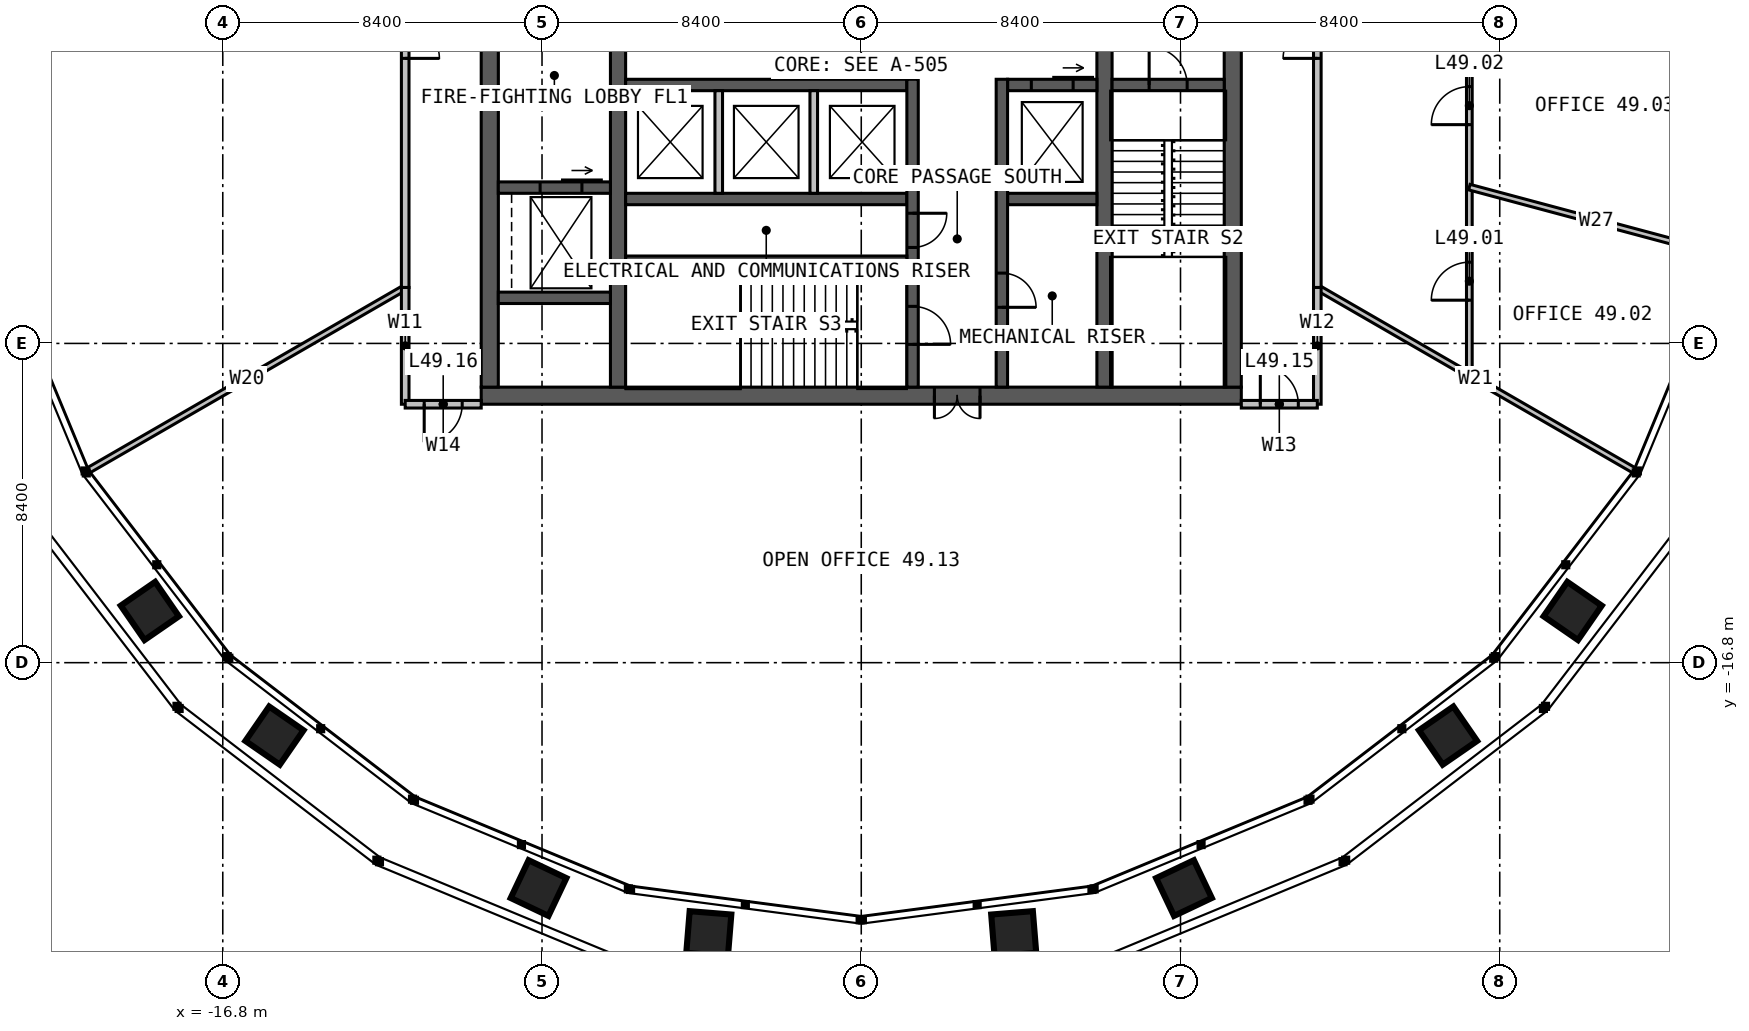
"""IFC4 building model, lengths in metres.
Left out: names, types, materials, properties, quantities, classifications, styles, units other than length and angle.
Written with IfcOpenShell. Run it as: python <this file> out.ifc"""

import sys

from ifc_helpers import new_model, si_unit, direction, frame, frame_2d, origin, place, context, subcontext, project, spatial, rectangle, extrude, element, fill, save


model = new_model("IFC4")
c1 = context("Model", 3, precision=1e-05, world=origin(), true_north=direction((0.0, 1.0)))
c2 = subcontext(c1, "Body", "Model", "MODEL_VIEW")
j1 = project(units=[si_unit("LENGTHUNIT", "METRE"), si_unit("PLANEANGLEUNIT", "RADIAN")], contexts=[c1])
p1 = place(None, origin())
s1 = spatial("IfcSite", under=j1, at=p1, CompositionType="ELEMENT")
p2 = place(p1, origin())
s2 = spatial("IfcBuilding", under=s1, at=p2, CompositionType="ELEMENT")
p3 = place(p2, frame((0.0, 0.0, 203.0)))
s3 = spatial("IfcBuildingStorey", under=s2, at=p3, CompositionType="ELEMENT", Elevation=203.0)
p4 = place(p3, frame((10.0, -9.775, 0.0), z_axis=(0.0, 0.0, 1.0), x_axis=(-1.0, 0.0, 0.0)))
e1 = element("IfcWall", 1, at=p4, inside=s3, PredefinedType="SOLIDWALL", context=c2, shape_type="SweptSolid", body=[
    extrude(rectangle(XDim=20.0, YDim=0.45, at=frame_2d((10.0, 0.0))), origin(), (0.0, 0.0, 1.0), 4.0),
])
p5 = place(p4, frame((6.875, 0.0, 0.0)))
e2 = element("IfcOpeningElement", 2, at=p5, cuts=e1, PredefinedType="OPENING", context=c2, shape_type="SweptSolid", body=[
    extrude(rectangle(XDim=1.2, YDim=2.2, at=frame_2d((0.6, 1.1))), frame((0.0, 0.235, 0.0), z_axis=(0.0, -1.0, 0.0), x_axis=(1.0, 0.0, 0.0)), (0.0, 0.0, 1.0), 0.47),
])
for number, where, z_axis, x_axis in (
    (3, (9.775, -9.55, 0.0), (0.0, 0.0, 1.0), (0.0, 1.0, 0.0)),
    (4, (-9.775, 9.55, 0.0), (0.0, 0.0, 1.0), (0.0, -1.0, 0.0)),
):
    element("IfcWall", number, at=place(p3, frame(where, z_axis=z_axis, x_axis=x_axis)), inside=s3, PredefinedType="SOLIDWALL", context=c2, shape_type="SweptSolid", body=[
        extrude(rectangle(XDim=19.1, YDim=0.45, at=frame_2d((9.55, 0.0))), origin(), (0.0, 0.0, 1.0), 4.0),
    ])
p6 = place(p3, frame((-6.4, -9.55, 0.0), z_axis=(0.0, 0.0, 1.0), x_axis=(0.0, 1.0, 0.0)))
e5 = element("IfcWall", 5, at=p6, inside=s3, PredefinedType="SOLIDWALL", context=c2, shape_type="SweptSolid", body=[
    extrude(rectangle(XDim=19.1, YDim=0.4, at=frame_2d((9.55, 0.0))), origin(), (0.0, 0.0, 1.0), 4.0),
])
p7 = place(p6, frame((9.05, 0.0, 0.0)))
e6 = element("IfcOpeningElement", 6, at=p7, cuts=e5, PredefinedType="OPENING", context=c2, shape_type="SweptSolid", body=[
    extrude(rectangle(XDim=1.0, YDim=2.2, at=frame_2d((0.5, 1.1))), frame((0.0, 0.21, 0.0), z_axis=(0.0, -1.0, 0.0), x_axis=(1.0, 0.0, 0.0)), (0.0, 0.0, 1.0), 0.42),
])
p8 = place(p3, frame((6.4, 9.55, 0.0), z_axis=(0.0, 0.0, 1.0), x_axis=(0.0, -1.0, 0.0)))
e7 = element("IfcWall", 7, at=p8, inside=s3, PredefinedType="SOLIDWALL", context=c2, shape_type="SweptSolid", body=[
    extrude(rectangle(XDim=19.1, YDim=0.4, at=frame_2d((9.55, 0.0))), origin(), (0.0, 0.0, 1.0), 4.0),
])
p9 = place(p8, frame((9.05, 0.0, 0.0)))
e8 = element("IfcOpeningElement", 8, at=p9, cuts=e7, PredefinedType="OPENING", context=c2, shape_type="SweptSolid", body=[
    extrude(rectangle(XDim=1.0, YDim=2.2, at=frame_2d((0.5, 1.1))), frame((0.0, 0.21, 0.0), z_axis=(0.0, -1.0, 0.0), x_axis=(1.0, 0.0, 0.0)), (0.0, 0.0, 1.0), 0.42),
])
p10 = place(p3, frame((-6.2, -1.6, 0.0), z_axis=(0.0, 0.0, 1.0), x_axis=(1.0, 0.0, 0.0)))
e9 = element("IfcWall", 9, at=p10, inside=s3, PredefinedType="SOLIDWALL", context=c2, shape_type="SweptSolid", body=[
    extrude(rectangle(XDim=7.4, YDim=0.3, at=frame_2d((3.7, 0.0))), origin(), (0.0, 0.0, 1.0), 4.0),
])
p11 = place(p3, frame((3.85, -1.6, 0.0), z_axis=(0.0, 0.0, 1.0), x_axis=(1.0, 0.0, 0.0)))
e10 = element("IfcWall", 10, at=p11, inside=s3, PredefinedType="SOLIDWALL", context=c2, shape_type="SweptSolid", body=[
    extrude(rectangle(XDim=2.35, YDim=0.3, at=frame_2d((1.175, 0.0))), origin(), (0.0, 0.0, 1.0), 4.0),
])
p12 = place(p11, frame((0.625, 0.0, 0.0)))
e11 = element("IfcOpeningElement", 11, at=p12, cuts=e10, PredefinedType="OPENING", context=c2, shape_type="SweptSolid", body=[
    extrude(rectangle(XDim=1.1, YDim=2.2, at=frame_2d((0.55, 1.1))), frame((0.0, 0.16, 0.0), z_axis=(0.0, -1.0, 0.0), x_axis=(1.0, 0.0, 0.0)), (0.0, 0.0, 1.0), 0.32),
])
p13 = place(p3, frame((-6.2, -4.6, 0.0), z_axis=(0.0, 0.0, 1.0), x_axis=(1.0, 0.0, 0.0)))
e12 = element("IfcWall", 12, at=p13, inside=s3, PredefinedType="SOLIDWALL", context=c2, shape_type="SweptSolid", body=[
    extrude(rectangle(XDim=7.4, YDim=0.3, at=frame_2d((3.7, 0.0))), origin(), (0.0, 0.0, 1.0), 4.0),
])
p14 = place(p3, frame((3.85, -4.6, 0.0), z_axis=(0.0, 0.0, 1.0), x_axis=(1.0, 0.0, 0.0)))
e13 = element("IfcWall", 13, at=p14, inside=s3, PredefinedType="SOLIDWALL", context=c2, shape_type="SweptSolid", body=[
    extrude(rectangle(XDim=2.35, YDim=0.3, at=frame_2d((1.175, 0.0))), origin(), (0.0, 0.0, 1.0), 4.0),
])
p15 = place(p3, frame((1.35, -1.45, 0.0), z_axis=(0.0, 0.0, 1.0), x_axis=(0.0, -1.0, 0.0)))
e14 = element("IfcWall", 14, at=p15, inside=s3, PredefinedType="SOLIDWALL", context=c2, shape_type="SweptSolid", body=[
    extrude(rectangle(XDim=8.1, YDim=0.3, at=frame_2d((4.05, 0.0))), origin(), (0.0, 0.0, 1.0), 4.0),
])
p16 = place(p15, frame((5.975, 0.0, 0.0)))
e15 = element("IfcOpeningElement", 15, at=p16, cuts=e14, PredefinedType="OPENING", context=c2, shape_type="SweptSolid", body=[
    extrude(rectangle(XDim=1.0, YDim=2.2, at=frame_2d((0.5, 1.1))), frame((0.0, 0.16, 0.0), z_axis=(0.0, -1.0, 0.0), x_axis=(1.0, 0.0, 0.0)), (0.0, 0.0, 1.0), 0.32),
])
p17 = place(p15, frame((3.525, 0.0, 0.0)))
e16 = element("IfcOpeningElement", 16, at=p17, cuts=e14, PredefinedType="OPENING", context=c2, shape_type="SweptSolid", body=[
    extrude(rectangle(XDim=0.9, YDim=2.2, at=frame_2d((0.45, 1.1))), frame((0.0, 0.16, 0.0), z_axis=(0.0, -1.0, 0.0), x_axis=(1.0, 0.0, 0.0)), (0.0, 0.0, 1.0), 0.32),
])
p18 = place(p3, frame((3.7, -1.45, 0.0), z_axis=(0.0, 0.0, 1.0), x_axis=(0.0, -1.0, 0.0)))
e17 = element("IfcWall", 17, at=p18, inside=s3, PredefinedType="SOLIDWALL", context=c2, shape_type="SweptSolid", body=[
    extrude(rectangle(XDim=8.1, YDim=0.3, at=frame_2d((4.05, 0.0))), origin(), (0.0, 0.0, 1.0), 4.0),
])
p19 = place(p18, frame((5.1, 0.0, 0.0)))
e18 = element("IfcOpeningElement", 18, at=p19, cuts=e17, PredefinedType="OPENING", context=c2, shape_type="SweptSolid", body=[
    extrude(rectangle(XDim=0.9, YDim=2.2, at=frame_2d((0.45, 1.1))), frame((0.0, 0.16, 0.0), z_axis=(0.0, -1.0, 0.0), x_axis=(1.0, 0.0, 0.0)), (0.0, 0.0, 1.0), 0.32),
])
p20 = place(p3, frame((-6.2, -6.2, 0.0), z_axis=(0.0, 0.0, 1.0), x_axis=(1.0, 0.0, 0.0)))
e19 = element("IfcWall", 19, at=p20, inside=s3, PredefinedType="SOLIDWALL", context=c2, shape_type="SweptSolid", body=[
    extrude(rectangle(XDim=7.4, YDim=0.2, at=frame_2d((3.7, 0.0))), origin(), (0.0, 0.0, 1.0), 4.0),
])
p21 = place(p3, frame((6.6, -1.6, 0.0), z_axis=(0.0, 0.0, 1.0), x_axis=(1.0, 0.0, 0.0)))
e20 = element("IfcWall", 20, at=p21, inside=s3, PredefinedType="SOLIDWALL", context=c2, shape_type="SweptSolid", body=[
    extrude(rectangle(XDim=2.95, YDim=0.3, at=frame_2d((1.475, 0.0))), origin(), (0.0, 0.0, 1.0), 4.0),
])
p22 = place(p21, frame((0.975, 0.0, 0.0)))
e21 = element("IfcOpeningElement", 21, at=p22, cuts=e20, PredefinedType="OPENING", context=c2, shape_type="SweptSolid", body=[
    extrude(rectangle(XDim=1.0, YDim=2.2, at=frame_2d((0.5, 1.1))), frame((0.0, 0.16, 0.0), z_axis=(0.0, -1.0, 0.0), x_axis=(1.0, 0.0, 0.0)), (0.0, 0.0, 1.0), 0.32),
])
p23 = place(p3, frame((-9.55, -4.3, 0.0), z_axis=(0.0, 0.0, 1.0), x_axis=(1.0, 0.0, 0.0)))
e22 = element("IfcWall", 22, at=p23, inside=s3, PredefinedType="SOLIDWALL", context=c2, shape_type="SweptSolid", body=[
    extrude(rectangle(XDim=2.95, YDim=0.3, at=frame_2d((1.475, 0.0))), origin(), (0.0, 0.0, 1.0), 4.0),
])
p24 = place(p23, frame((1.1, 0.0, 0.0)))
e23 = element("IfcOpeningElement", 23, at=p24, cuts=e22, PredefinedType="OPENING", context=c2, shape_type="SweptSolid", body=[
    extrude(rectangle(XDim=1.1, YDim=2.2, at=frame_2d((0.55, 1.1))), frame((0.0, 0.16, 0.0), z_axis=(0.0, -1.0, 0.0), x_axis=(1.0, 0.0, 0.0)), (0.0, 0.0, 1.0), 0.32),
])
p25 = place(p3, frame((-9.55, -7.2, 0.0), z_axis=(0.0, 0.0, 1.0), x_axis=(1.0, 0.0, 0.0)))
e24 = element("IfcWall", 24, at=p25, inside=s3, PredefinedType="SOLIDWALL", context=c2, shape_type="SweptSolid", body=[
    extrude(rectangle(XDim=2.95, YDim=0.3, at=frame_2d((1.475, 0.0))), origin(), (0.0, 0.0, 1.0), 4.0),
])
for number, where, z_axis, x_axis in (
    (25, (-3.75, -1.75, 0.0), (0.0, 0.0, 1.0), (0.0, -1.0, 0.0)),
    (26, (-1.25, -1.75, 0.0), (0.0, 0.0, 1.0), (0.0, -1.0, 0.0)),
):
    element("IfcWall", number, at=place(p3, frame(where, z_axis=z_axis, x_axis=x_axis)), inside=s3, PredefinedType="SOLIDWALL", context=c2, shape_type="SweptSolid", body=[
        extrude(rectangle(XDim=2.7, YDim=0.2, at=frame_2d((1.35, 0.0))), origin(), (0.0, 0.0, 1.0), 3.75),
    ])
for number, where, z_axis, x_axis in (
    (27, (12.0, -6.928, 0.0), (0.0, 0.0, 1.0), (0.866, -0.5, 0.0)),
    (28, (-12.0, -6.928, 0.0), (0.0, 0.0, 1.0), (-0.866, -0.5, 0.0)),
):
    element("IfcWall", number, at=place(p3, frame(where, z_axis=z_axis, x_axis=x_axis)), inside=s3, PredefinedType="PARTITIONING", context=c2, shape_type="SweptSolid", body=[
        extrude(rectangle(XDim=9.62, YDim=0.15, at=frame_2d((4.81, 0.0))), origin(), (0.0, 0.0, 1.0), 2.79),
    ])
p26 = place(p3, frame((16.0, -9.238, 0.0), z_axis=(0.0, 0.0, 1.0), x_axis=(0.0, 1.0, 0.0)))
e29 = element("IfcWall", 29, at=p26, inside=s3, PredefinedType="PARTITIONING", context=c2, shape_type="SweptSolid", body=[
    extrude(rectangle(XDim=18.475, YDim=0.15, at=frame_2d((9.238, 0.0))), origin(), (0.0, 0.0, 1.0), 2.79),
])
p27 = place(p26, frame((1.975, 0.0, 0.0)))
e30 = element("IfcOpeningElement", 30, at=p27, cuts=e29, PredefinedType="OPENING", context=c2, shape_type="SweptSolid", body=[
    extrude(rectangle(XDim=1.0, YDim=2.2, at=frame_2d((0.5, 1.1))), frame((0.0, 0.085, 0.0), z_axis=(0.0, -1.0, 0.0), x_axis=(1.0, 0.0, 0.0)), (0.0, 0.0, 1.0), 0.17),
])
p28 = place(p26, frame((6.594, 0.0, 0.0)))
e31 = element("IfcOpeningElement", 31, at=p28, cuts=e29, PredefinedType="OPENING", context=c2, shape_type="SweptSolid", body=[
    extrude(rectangle(XDim=1.0, YDim=2.2, at=frame_2d((0.5, 1.1))), frame((0.0, 0.085, 0.0), z_axis=(0.0, -1.0, 0.0), x_axis=(1.0, 0.0, 0.0)), (0.0, 0.0, 1.0), 0.17),
])
p29 = place(p26, frame((12.956, 0.0, 0.0)))
e32 = element("IfcOpeningElement", 32, at=p29, cuts=e29, PredefinedType="OPENING", context=c2, shape_type="SweptSolid", body=[
    extrude(rectangle(XDim=1.8, YDim=2.2, at=frame_2d((0.9, 1.1))), frame((0.0, 0.085, 0.0), z_axis=(0.0, -1.0, 0.0), x_axis=(1.0, 0.0, 0.0)), (0.0, 0.0, 1.0), 0.17),
])
p30 = place(p3, frame((16.0, -4.287, 0.0), z_axis=(0.0, 0.0, 1.0), x_axis=(0.965919985666, -0.258840841621, 0.0)))
e33 = element("IfcWall", 33, at=p30, inside=s3, PredefinedType="PARTITIONING", context=c2, shape_type="SweptSolid", body=[
    extrude(rectangle(XDim=6.912, YDim=0.15, at=frame_2d((3.456, 0.0))), origin(), (0.0, 0.0, 1.0), 2.79),
])
p31 = place(p3, frame((12.0, -6.928, 0.0), z_axis=(0.0, 0.0, 1.0), x_axis=(0.0, 1.0, 0.0)))
e34 = element("IfcWall", 34, at=p31, inside=s3, PredefinedType="PARTITIONING", context=c2, shape_type="SweptSolid", body=[
    extrude(rectangle(XDim=13.856, YDim=0.2, at=frame_2d((6.928, 0.0))), origin(), (0.0, 0.0, 1.0), 3.8),
])
p32 = place(p31, frame((6.028, 0.0, 0.0)))
e35 = element("IfcOpeningElement", 35, at=p32, cuts=e34, PredefinedType="OPENING", context=c2, shape_type="SweptSolid", body=[
    extrude(rectangle(XDim=1.8, YDim=2.2, at=frame_2d((0.9, 1.1))), frame((0.0, 0.11, 0.0), z_axis=(0.0, -1.0, 0.0), x_axis=(1.0, 0.0, 0.0)), (0.0, 0.0, 1.0), 0.22),
])
p33 = place(p3, frame((-12.0, 6.928, 0.0), z_axis=(0.0, 0.0, 1.0), x_axis=(0.0, -1.0, 0.0)))
e36 = element("IfcWall", 36, at=p33, inside=s3, PredefinedType="PARTITIONING", context=c2, shape_type="SweptSolid", body=[
    extrude(rectangle(XDim=13.856, YDim=0.2, at=frame_2d((6.928, 0.0))), origin(), (0.0, 0.0, 1.0), 3.8),
])
p34 = place(p33, frame((6.028, 0.0, 0.0)))
e37 = element("IfcOpeningElement", 37, at=p34, cuts=e36, PredefinedType="OPENING", context=c2, shape_type="SweptSolid", body=[
    extrude(rectangle(XDim=1.8, YDim=2.2, at=frame_2d((0.9, 1.1))), frame((0.0, 0.11, 0.0), z_axis=(0.0, -1.0, 0.0), x_axis=(1.0, 0.0, 0.0)), (0.0, 0.0, 1.0), 0.22),
])
for number, where, z_axis, x_axis in (
    (38, (-12.0, -6.928, 0.0), (0.0, 0.0, 1.0), (0.0, -1.0, 0.0)),
    (39, (12.0, -10.0, 0.0), (0.0, 0.0, 1.0), (0.0, 1.0, 0.0)),
):
    element("IfcWall", number, at=place(p3, frame(where, z_axis=z_axis, x_axis=x_axis)), inside=s3, PredefinedType="PARTITIONING", context=c2, shape_type="SweptSolid", body=[
        extrude(rectangle(XDim=3.072, YDim=0.2, at=frame_2d((1.536, 0.0))), origin(), (0.0, 0.0, 1.0), 3.8),
    ])
p35 = place(p3, frame((10.0, -10.0, 0.0), z_axis=(0.0, 0.0, 1.0), x_axis=(1.0, 0.0, 0.0)))
e40 = element("IfcWall", 40, at=p35, inside=s3, PredefinedType="PARTITIONING", context=c2, shape_type="SweptSolid", body=[
    extrude(rectangle(XDim=2.0, YDim=0.2, at=frame_2d((1.0, 0.0))), origin(), (0.0, 0.0, 1.0), 3.8),
])
p36 = place(p35, frame((0.5, 0.0, 0.0)))
e41 = element("IfcOpeningElement", 41, at=p36, cuts=e40, PredefinedType="OPENING", context=c2, shape_type="SweptSolid", body=[
    extrude(rectangle(XDim=1.0, YDim=2.2, at=frame_2d((0.5, 1.1))), frame((0.0, 0.11, 0.0), z_axis=(0.0, -1.0, 0.0), x_axis=(1.0, 0.0, 0.0)), (0.0, 0.0, 1.0), 0.22),
])
p37 = place(p3, frame((-10.0, -10.0, 0.0), z_axis=(0.0, 0.0, 1.0), x_axis=(-1.0, 0.0, 0.0)))
e42 = element("IfcWall", 42, at=p37, inside=s3, PredefinedType="PARTITIONING", context=c2, shape_type="SweptSolid", body=[
    extrude(rectangle(XDim=2.0, YDim=0.2, at=frame_2d((1.0, 0.0))), origin(), (0.0, 0.0, 1.0), 3.8),
])
p38 = place(p37, frame((0.5, 0.0, 0.0)))
e43 = element("IfcOpeningElement", 43, at=p38, cuts=e42, PredefinedType="OPENING", context=c2, shape_type="SweptSolid", body=[
    extrude(rectangle(XDim=1.0, YDim=2.2, at=frame_2d((0.5, 1.1))), frame((0.0, 0.11, 0.0), z_axis=(0.0, -1.0, 0.0), x_axis=(1.0, 0.0, 0.0)), (0.0, 0.0, 1.0), 0.22),
])
p39 = place(p5, origin())
e44 = element("IfcDoor", 44, at=p39, inside=s3, OperationType="DOUBLE_DOOR_SINGLE_SWING", PredefinedType="DOOR", context=c2, shape_type="SweptSolid", body=[
    extrude(rectangle(XDim=1.2, YDim=2.2, at=frame_2d((0.6, 1.1))), frame((0.0, 0.025, 0.0), z_axis=(0.0, -1.0, 0.0), x_axis=(1.0, 0.0, 0.0)), (0.0, 0.0, 1.0), 0.05),
])
fill(e2, e44)
p40 = place(p22, origin())
e45 = element("IfcDoor", 45, at=p40, inside=s3, OperationType="SINGLE_SWING_LEFT", PredefinedType="DOOR", context=c2, shape_type="SweptSolid", body=[
    extrude(rectangle(XDim=1.0, YDim=2.2, at=frame_2d((0.5, 1.1))), frame((0.0, 0.025, 0.0), z_axis=(0.0, -1.0, 0.0), x_axis=(1.0, 0.0, 0.0)), (0.0, 0.0, 1.0), 0.05),
])
fill(e21, e45)
p41 = place(p16, origin())
e46 = element("IfcDoor", 46, at=p41, inside=s3, OperationType="SINGLE_SWING_RIGHT", PredefinedType="DOOR", context=c2, shape_type="SweptSolid", body=[
    extrude(rectangle(XDim=1.0, YDim=2.2, at=frame_2d((0.5, 1.1))), frame((0.0, 0.025, 0.0), z_axis=(0.0, -1.0, 0.0), x_axis=(1.0, 0.0, 0.0)), (0.0, 0.0, 1.0), 0.05),
])
fill(e15, e46)
p42 = place(p17, origin())
e47 = element("IfcDoor", 47, at=p42, inside=s3, OperationType="SINGLE_SWING_LEFT", PredefinedType="DOOR", context=c2, shape_type="SweptSolid", body=[
    extrude(rectangle(XDim=0.9, YDim=2.2, at=frame_2d((0.45, 1.1))), frame((0.0, 0.025, 0.0), z_axis=(0.0, -1.0, 0.0), x_axis=(1.0, 0.0, 0.0)), (0.0, 0.0, 1.0), 0.05),
])
fill(e16, e47)
p43 = place(p19, origin())
e48 = element("IfcDoor", 48, at=p43, inside=s3, OperationType="SINGLE_SWING_RIGHT", PredefinedType="DOOR", context=c2, shape_type="SweptSolid", body=[
    extrude(rectangle(XDim=0.9, YDim=2.2, at=frame_2d((0.45, 1.1))), frame((0.0, 0.025, 0.0), z_axis=(0.0, -1.0, 0.0), x_axis=(1.0, 0.0, 0.0)), (0.0, 0.0, 1.0), 0.05),
])
fill(e18, e48)
p44 = place(p12, origin())
e49 = element("IfcDoor", 49, at=p44, inside=s3, OperationType="SLIDING_TO_LEFT", PredefinedType="DOOR", context=c2, shape_type="SweptSolid", body=[
    extrude(rectangle(XDim=1.1, YDim=2.2, at=frame_2d((0.55, 1.1))), frame((0.0, 0.025, 0.0), z_axis=(0.0, -1.0, 0.0), x_axis=(1.0, 0.0, 0.0)), (0.0, 0.0, 1.0), 0.05),
])
fill(e11, e49)
p45 = place(p24, origin())
e50 = element("IfcDoor", 50, at=p45, inside=s3, OperationType="SLIDING_TO_LEFT", PredefinedType="DOOR", context=c2, shape_type="SweptSolid", body=[
    extrude(rectangle(XDim=1.1, YDim=2.2, at=frame_2d((0.55, 1.1))), frame((0.0, 0.025, 0.0), z_axis=(0.0, -1.0, 0.0), x_axis=(1.0, 0.0, 0.0)), (0.0, 0.0, 1.0), 0.05),
])
fill(e23, e50)
p46 = place(p27, origin())
e51 = element("IfcDoor", 51, at=p46, inside=s3, OperationType="SINGLE_SWING_LEFT", PredefinedType="DOOR", context=c2, shape_type="SweptSolid", body=[
    extrude(rectangle(XDim=1.0, YDim=2.2, at=frame_2d((0.5, 1.1))), frame((0.0, 0.025, 0.0), z_axis=(0.0, -1.0, 0.0), x_axis=(1.0, 0.0, 0.0)), (0.0, 0.0, 1.0), 0.05),
])
fill(e30, e51)
p47 = place(p28, origin())
e52 = element("IfcDoor", 52, at=p47, inside=s3, OperationType="SINGLE_SWING_LEFT", PredefinedType="DOOR", context=c2, shape_type="SweptSolid", body=[
    extrude(rectangle(XDim=1.0, YDim=2.2, at=frame_2d((0.5, 1.1))), frame((0.0, 0.025, 0.0), z_axis=(0.0, -1.0, 0.0), x_axis=(1.0, 0.0, 0.0)), (0.0, 0.0, 1.0), 0.05),
])
fill(e31, e52)
p48 = place(p32, origin())
e53 = element("IfcDoor", 53, at=p48, inside=s3, OperationType="DOUBLE_DOOR_SINGLE_SWING", PredefinedType="DOOR", context=c2, shape_type="SweptSolid", body=[
    extrude(rectangle(XDim=1.8, YDim=2.2, at=frame_2d((0.9, 1.1))), frame((0.0, 0.025, 0.0), z_axis=(0.0, -1.0, 0.0), x_axis=(1.0, 0.0, 0.0)), (0.0, 0.0, 1.0), 0.05),
])
fill(e35, e53)
p49 = place(p34, origin())
e54 = element("IfcDoor", 54, at=p49, inside=s3, OperationType="DOUBLE_DOOR_SINGLE_SWING", PredefinedType="DOOR", context=c2, shape_type="SweptSolid", body=[
    extrude(rectangle(XDim=1.8, YDim=2.2, at=frame_2d((0.9, 1.1))), frame((0.0, 0.025, 0.0), z_axis=(0.0, -1.0, 0.0), x_axis=(1.0, 0.0, 0.0)), (0.0, 0.0, 1.0), 0.05),
])
fill(e37, e54)
p50 = place(p36, origin())
e55 = element("IfcDoor", 55, at=p50, inside=s3, OperationType="SINGLE_SWING_LEFT", PredefinedType="DOOR", context=c2, shape_type="SweptSolid", body=[
    extrude(rectangle(XDim=1.0, YDim=2.2, at=frame_2d((0.5, 1.1))), frame((0.0, 0.025, 0.0), z_axis=(0.0, -1.0, 0.0), x_axis=(1.0, 0.0, 0.0)), (0.0, 0.0, 1.0), 0.05),
])
fill(e41, e55)
p51 = place(p38, origin())
e56 = element("IfcDoor", 56, at=p51, inside=s3, OperationType="SINGLE_SWING_RIGHT", PredefinedType="DOOR", context=c2, shape_type="SweptSolid", body=[
    extrude(rectangle(XDim=1.0, YDim=2.2, at=frame_2d((0.5, 1.1))), frame((0.0, 0.025, 0.0), z_axis=(0.0, -1.0, 0.0), x_axis=(1.0, 0.0, 0.0)), (0.0, 0.0, 1.0), 0.05),
])
fill(e43, e56)
save(model, sys.argv[1])
